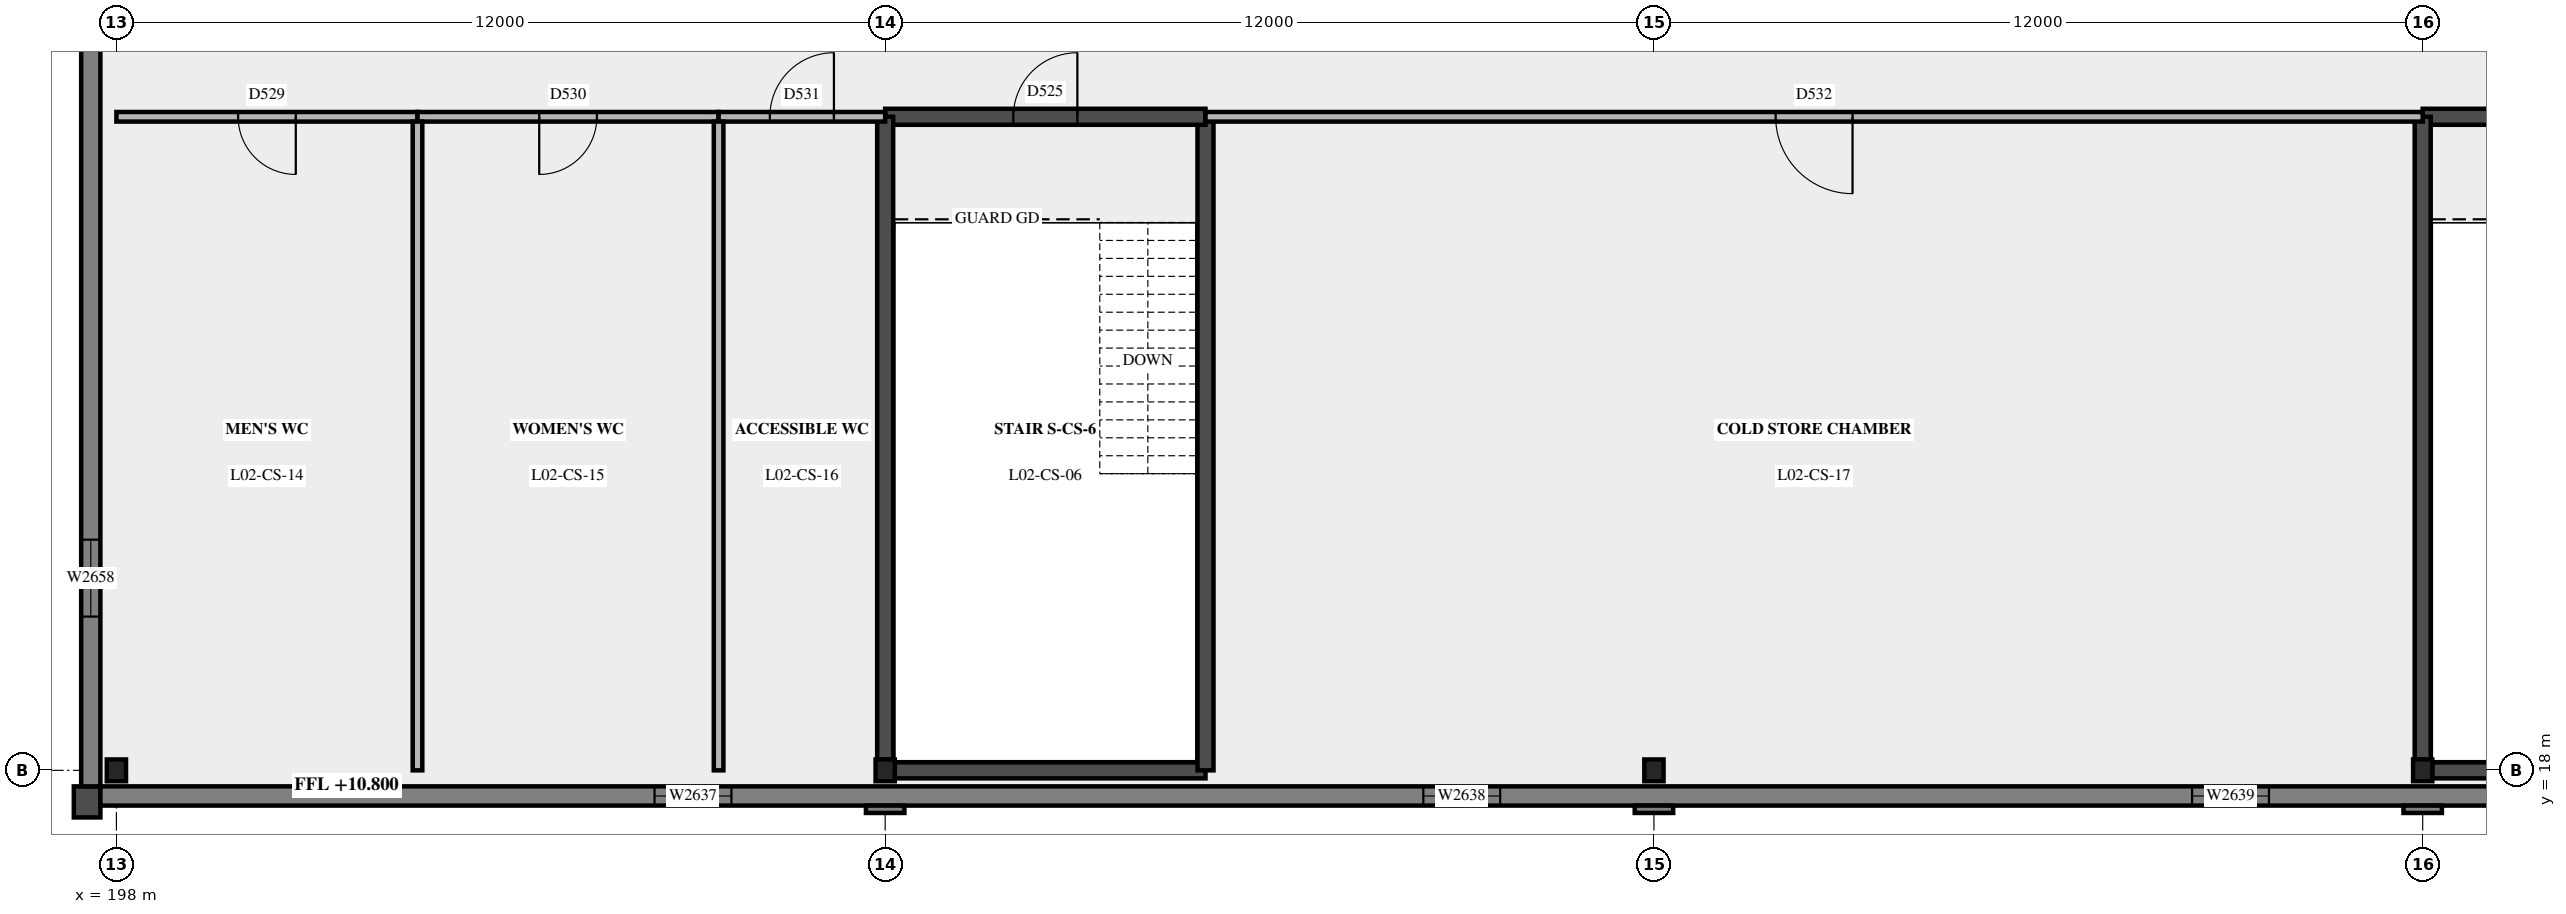
"""IFC4 building model, lengths in metres.
Left out: names, types, materials, properties, quantities, classifications, styles, units other than length and angle.
Written with IfcOpenShell. Run it as: python <this file> out.ifc"""

import sys

from ifc_helpers import new_model, si_unit, direction, frame, frame_2d, origin, origin_2d, place, context, subcontext, project, spatial, polyline, rectangle, i_section, outline, extrude, element, fill, save


model = new_model("IFC4")
c1 = context("Model", 3, precision=1e-05, world=origin(), true_north=direction((0.0, 1.0)))
c2 = subcontext(c1, "Body", "Model", "MODEL_VIEW")
j1 = project(units=[si_unit("LENGTHUNIT", "METRE"), si_unit("PLANEANGLEUNIT", "RADIAN")], contexts=[c1])
p1 = place(None, origin())
s1 = spatial("IfcSite", under=j1, at=p1, CompositionType="ELEMENT")
p2 = place(p1, origin())
s2 = spatial("IfcBuilding", under=s1, at=p2, CompositionType="ELEMENT")
p3 = place(p2, frame((0.0, 0.0, 10.8)))
s3 = spatial("IfcBuildingStorey", under=s2, at=p3, CompositionType="ELEMENT", Elevation=10.8)
for number, where, z_axis, x_axis in (
    (1, (198.0, 18.0, 0.0), (0.0, 0.0, 1.0), (1.0, 0.0, 0.0)),
    (2, (210.0, 18.0, 0.0), (0.0, 0.0, 1.0), (1.0, 0.0, 0.0)),
    (3, (222.0, 18.0, 0.0), (0.0, 0.0, 1.0), (1.0, 0.0, 0.0)),
    (4, (234.0, 18.0, 0.0), (0.0, 0.0, 1.0), (1.0, 0.0, 0.0)),
):
    element("IfcColumn", number, at=place(p3, frame(where, z_axis=z_axis, x_axis=x_axis)), inside=s3, PredefinedType="COLUMN", context=c2, shape_type="SweptSolid", body=[
        extrude(i_section(OverallWidth=0.3, OverallDepth=0.34, WebThickness=0.012, FlangeThickness=0.021, at=origin_2d()), origin(), (0.0, 0.0, 1.0), 5.4),
    ])
p4 = place(p3, frame((234.15, 18.0, 0.0), z_axis=(0.0, 0.0, 1.0), x_axis=(1.0, 0.0, 0.0)))
e5 = element("IfcWall", 5, at=p4, inside=s3, PredefinedType="SHEAR", context=c2, shape_type="SweptSolid", body=[
    extrude(rectangle(XDim=4.85, YDim=0.25, at=frame_2d((2.425, 0.0))), origin(), (0.0, 0.0, 1.0), 5.15),
])
p5 = place(p3, frame((234.0, 28.2, 0.0), z_axis=(0.0, 0.0, 1.0), x_axis=(1.0, 0.0, 0.0)))
e6 = element("IfcWall", 6, at=p5, inside=s3, PredefinedType="SHEAR", context=c2, shape_type="SweptSolid", body=[
    extrude(rectangle(XDim=5.0, YDim=0.25, at=frame_2d((2.5, 0.0))), origin(), (0.0, 0.0, 1.0), 5.15),
])
p6 = place(p5, frame((2.0, 0.0, 0.0)))
e7 = element("IfcOpeningElement", 7, at=p6, cuts=e6, PredefinedType="OPENING", context=c2, shape_type="SweptSolid", body=[
    extrude(rectangle(XDim=1.0, YDim=2.1, at=frame_2d((0.5, 1.05))), frame((0.0, 0.135, 0.0), z_axis=(0.0, -1.0, 0.0), x_axis=(1.0, 0.0, 0.0)), (0.0, 0.0, 1.0), 0.27),
])
p7 = place(p3, frame((234.0, 18.17, 0.0), z_axis=(0.0, 0.0, 1.0), x_axis=(0.0, 1.0, 0.0)))
e8 = element("IfcWall", 8, at=p7, inside=s3, PredefinedType="SHEAR", context=c2, shape_type="SweptSolid", body=[
    extrude(rectangle(XDim=10.03, YDim=0.25, at=frame_2d((5.015, 0.0))), origin(), (0.0, 0.0, 1.0), 5.15),
])
p8 = place(p3, frame((210.15, 18.0, 0.0), z_axis=(0.0, 0.0, 1.0), x_axis=(1.0, 0.0, 0.0)))
e9 = element("IfcWall", 9, at=p8, inside=s3, PredefinedType="SHEAR", context=c2, shape_type="SweptSolid", body=[
    extrude(rectangle(XDim=4.85, YDim=0.25, at=frame_2d((2.425, 0.0))), origin(), (0.0, 0.0, 1.0), 5.15),
])
p9 = place(p3, frame((215.0, 18.0, 0.0), z_axis=(0.0, 0.0, 1.0), x_axis=(0.0, 1.0, 0.0)))
e10 = element("IfcWall", 10, at=p9, inside=s3, PredefinedType="SHEAR", context=c2, shape_type="SweptSolid", body=[
    extrude(rectangle(XDim=10.2, YDim=0.25, at=frame_2d((5.1, 0.0))), origin(), (0.0, 0.0, 1.0), 5.15),
])
p10 = place(p3, frame((210.0, 28.2, 0.0), z_axis=(0.0, 0.0, 1.0), x_axis=(1.0, 0.0, 0.0)))
e11 = element("IfcWall", 11, at=p10, inside=s3, PredefinedType="SHEAR", context=c2, shape_type="SweptSolid", body=[
    extrude(rectangle(XDim=5.0, YDim=0.25, at=frame_2d((2.5, 0.0))), origin(), (0.0, 0.0, 1.0), 5.15),
])
p11 = place(p10, frame((2.0, 0.0, 0.0)))
e12 = element("IfcOpeningElement", 12, at=p11, cuts=e11, PredefinedType="OPENING", context=c2, shape_type="SweptSolid", body=[
    extrude(rectangle(XDim=1.0, YDim=2.1, at=frame_2d((0.5, 1.05))), frame((0.0, 0.135, 0.0), z_axis=(0.0, -1.0, 0.0), x_axis=(1.0, 0.0, 0.0)), (0.0, 0.0, 1.0), 0.27),
])
p12 = place(p3, frame((210.0, 18.17, 0.0), z_axis=(0.0, 0.0, 1.0), x_axis=(0.0, 1.0, 0.0)))
e13 = element("IfcWall", 13, at=p12, inside=s3, PredefinedType="SHEAR", context=c2, shape_type="SweptSolid", body=[
    extrude(rectangle(XDim=10.03, YDim=0.25, at=frame_2d((5.015, 0.0))), origin(), (0.0, 0.0, 1.0), 5.15),
])
p13 = place(p3, frame((197.75, 17.508, 0.0), z_axis=(0.0, 0.0, 1.0), x_axis=(-1.0, 0.0, 0.0)))
e14 = element("IfcWall", 14, at=p13, inside=s3, PredefinedType="SOLIDWALL", context=c2, shape_type="SweptSolid", body=[
    extrude(rectangle(XDim=0.415, YDim=0.485, at=frame_2d((0.208, 0.0))), origin(), (0.0, 0.0, 1.0), 5.01),
])
p14 = place(p3, frame((197.75, 17.472, 5.01), z_axis=(0.0, 0.0, 1.0), x_axis=(-1.0, 0.0, 0.0)))
e15 = element("IfcWall", 15, at=p14, inside=s3, PredefinedType="SOLIDWALL", context=c2, shape_type="SweptSolid", body=[
    extrude(rectangle(XDim=0.53, YDim=0.555, at=frame_2d((0.265, 0.0))), origin(), (0.0, 0.0, 1.0), 0.13),
])
p15 = place(p3, frame((197.75, 17.438, 5.14), z_axis=(0.0, 0.0, 1.0), x_axis=(-1.0, 0.0, 0.0)))
e16 = element("IfcWall", 16, at=p15, inside=s3, PredefinedType="SOLIDWALL", context=c2, shape_type="SweptSolid", body=[
    extrude(rectangle(XDim=0.645, YDim=0.625, at=frame_2d((0.323, 0.0))), origin(), (0.0, 0.0, 1.0), 0.13),
])
p16 = place(p3, frame((197.75, 17.403, 5.27), z_axis=(0.0, 0.0, 1.0), x_axis=(-1.0, 0.0, 0.0)))
e17 = element("IfcWall", 17, at=p16, inside=s3, PredefinedType="SOLIDWALL", context=c2, shape_type="SweptSolid", body=[
    extrude(rectangle(XDim=0.76, YDim=0.695, at=frame_2d((0.38, 0.0))), origin(), (0.0, 0.0, 1.0), 0.13),
])
p17 = place(p3, frame((197.75, 17.6, 0.0), z_axis=(0.0, 0.0, 1.0), x_axis=(1.0, 0.0, 0.0)))
e18 = element("IfcWall", 18, at=p17, inside=s3, PredefinedType="SOLIDWALL", context=c2, shape_type="SweptSolid", body=[
    extrude(rectangle(XDim=84.5, YDim=0.3, at=frame_2d((42.25, 0.0))), origin(), (0.0, 0.0, 1.0), 5.4),
])
p18 = place(p17, frame((8.65, 0.0, 1.2)))
e19 = element("IfcOpeningElement", 19, at=p18, cuts=e18, PredefinedType="OPENING", context=c2, shape_type="SweptSolid", body=[
    extrude(rectangle(XDim=1.2, YDim=1.5, at=frame_2d((0.6, 0.75))), frame((0.0, 0.16, 0.0), z_axis=(0.0, -1.0, 0.0), x_axis=(1.0, 0.0, 0.0)), (0.0, 0.0, 1.0), 0.32),
])
p19 = place(p17, frame((20.65, 0.0, 1.2)))
e20 = element("IfcOpeningElement", 20, at=p19, cuts=e18, PredefinedType="OPENING", context=c2, shape_type="SweptSolid", body=[
    extrude(rectangle(XDim=1.2, YDim=1.5, at=frame_2d((0.6, 0.75))), frame((0.0, 0.16, 0.0), z_axis=(0.0, -1.0, 0.0), x_axis=(1.0, 0.0, 0.0)), (0.0, 0.0, 1.0), 0.32),
])
p20 = place(p17, frame((32.65, 0.0, 1.2)))
e21 = element("IfcOpeningElement", 21, at=p20, cuts=e18, PredefinedType="OPENING", context=c2, shape_type="SweptSolid", body=[
    extrude(rectangle(XDim=1.2, YDim=1.5, at=frame_2d((0.6, 0.75))), frame((0.0, 0.16, 0.0), z_axis=(0.0, -1.0, 0.0), x_axis=(1.0, 0.0, 0.0)), (0.0, 0.0, 1.0), 0.32),
])
p21 = place(p17, frame((44.65, 0.0, 1.2)))
e22 = element("IfcOpeningElement", 22, at=p21, cuts=e18, PredefinedType="OPENING", context=c2, shape_type="SweptSolid", body=[
    extrude(rectangle(XDim=1.2, YDim=1.5, at=frame_2d((0.6, 0.75))), frame((0.0, 0.16, 0.0), z_axis=(0.0, -1.0, 0.0), x_axis=(1.0, 0.0, 0.0)), (0.0, 0.0, 1.0), 0.32),
])
p22 = place(p17, frame((56.65, 0.0, 1.2)))
e23 = element("IfcOpeningElement", 23, at=p22, cuts=e18, PredefinedType="OPENING", context=c2, shape_type="SweptSolid", body=[
    extrude(rectangle(XDim=1.2, YDim=1.5, at=frame_2d((0.6, 0.75))), frame((0.0, 0.16, 0.0), z_axis=(0.0, -1.0, 0.0), x_axis=(1.0, 0.0, 0.0)), (0.0, 0.0, 1.0), 0.32),
])
p23 = place(p17, frame((68.65, 0.0, 1.2)))
e24 = element("IfcOpeningElement", 24, at=p23, cuts=e18, PredefinedType="OPENING", context=c2, shape_type="SweptSolid", body=[
    extrude(rectangle(XDim=1.2, YDim=1.5, at=frame_2d((0.6, 0.75))), frame((0.0, 0.16, 0.0), z_axis=(0.0, -1.0, 0.0), x_axis=(1.0, 0.0, 0.0)), (0.0, 0.0, 1.0), 0.32),
])
p24 = place(p17, frame((80.65, 0.0, 1.2)))
e25 = element("IfcOpeningElement", 25, at=p24, cuts=e18, PredefinedType="OPENING", context=c2, shape_type="SweptSolid", body=[
    extrude(rectangle(XDim=1.2, YDim=1.5, at=frame_2d((0.6, 0.75))), frame((0.0, 0.16, 0.0), z_axis=(0.0, -1.0, 0.0), x_axis=(1.0, 0.0, 0.0)), (0.0, 0.0, 1.0), 0.32),
])
for number, where, z_axis, x_axis in (
    (26, (209.7, 17.393, 0.0), (0.0, 0.0, 1.0), (1.0, 0.0, 0.0)),
    (27, (221.7, 17.393, 0.0), (0.0, 0.0, 1.0), (1.0, 0.0, 0.0)),
    (28, (233.7, 17.393, 0.0), (0.0, 0.0, 1.0), (1.0, 0.0, 0.0)),
):
    element("IfcWall", number, at=place(p3, frame(where, z_axis=z_axis, x_axis=x_axis)), inside=s3, PredefinedType="SOLIDWALL", context=c2, shape_type="SweptSolid", body=[
        extrude(rectangle(XDim=0.6, YDim=0.115, at=frame_2d((0.3, 0.0))), origin(), (0.0, 0.0, 1.0), 5.4),
    ])
p25 = place(p3, frame((197.6, 66.25, 0.0), z_axis=(0.0, 0.0, 1.0), x_axis=(0.0, -1.0, 0.0)))
e29 = element("IfcWall", 29, at=p25, inside=s3, PredefinedType="SOLIDWALL", context=c2, shape_type="SweptSolid", body=[
    extrude(rectangle(XDim=48.5, YDim=0.3, at=frame_2d((24.25, 0.0))), origin(), (0.0, 0.0, 1.0), 5.4),
])
p26 = place(p25, frame((8.65, 0.0, 1.2)))
e30 = element("IfcOpeningElement", 30, at=p26, cuts=e29, PredefinedType="OPENING", context=c2, shape_type="SweptSolid", body=[
    extrude(rectangle(XDim=1.2, YDim=1.5, at=frame_2d((0.6, 0.75))), frame((0.0, 0.16, 0.0), z_axis=(0.0, -1.0, 0.0), x_axis=(1.0, 0.0, 0.0)), (0.0, 0.0, 1.0), 0.32),
])
p27 = place(p25, frame((20.65, 0.0, 1.2)))
e31 = element("IfcOpeningElement", 31, at=p27, cuts=e29, PredefinedType="OPENING", context=c2, shape_type="SweptSolid", body=[
    extrude(rectangle(XDim=1.2, YDim=1.5, at=frame_2d((0.6, 0.75))), frame((0.0, 0.16, 0.0), z_axis=(0.0, -1.0, 0.0), x_axis=(1.0, 0.0, 0.0)), (0.0, 0.0, 1.0), 0.32),
])
p28 = place(p25, frame((32.65, 0.0, 1.2)))
e32 = element("IfcOpeningElement", 32, at=p28, cuts=e29, PredefinedType="OPENING", context=c2, shape_type="SweptSolid", body=[
    extrude(rectangle(XDim=1.2, YDim=1.5, at=frame_2d((0.6, 0.75))), frame((0.0, 0.16, 0.0), z_axis=(0.0, -1.0, 0.0), x_axis=(1.0, 0.0, 0.0)), (0.0, 0.0, 1.0), 0.32),
])
p29 = place(p25, frame((44.65, 0.0, 1.2)))
e33 = element("IfcOpeningElement", 33, at=p29, cuts=e29, PredefinedType="OPENING", context=c2, shape_type="SweptSolid", body=[
    extrude(rectangle(XDim=1.2, YDim=1.5, at=frame_2d((0.6, 0.75))), frame((0.0, 0.16, 0.0), z_axis=(0.0, -1.0, 0.0), x_axis=(1.0, 0.0, 0.0)), (0.0, 0.0, 1.0), 0.32),
])
p30 = place(p3, frame((198.0, 28.2, 0.0), z_axis=(0.0, 0.0, 1.0), x_axis=(1.0, 0.0, 0.0)))
e34 = element("IfcWall", 34, at=p30, inside=s3, PredefinedType="PARTITIONING", context=c2, shape_type="SweptSolid", body=[
    extrude(outline(polyline([(0.0, 0.0), (4.7, 0.0), (4.7, 5.15), (2.505, 5.15), (2.5, 4.63), (2.3, 4.63), (2.295, 5.15), (0.1, 5.15), (0.095, 4.68), (0.0, 4.68), (0.0, 0.0)])), frame((0.0, 0.075, 0.0), z_axis=(0.0, -1.0, 0.0), x_axis=(1.0, 0.0, 0.0)), (0.0, 0.0, 1.0), 0.15),
])
p31 = place(p30, frame((1.9, 0.0, 0.0)))
e35 = element("IfcOpeningElement", 35, at=p31, cuts=e34, PredefinedType="OPENING", context=c2, shape_type="SweptSolid", body=[
    extrude(rectangle(XDim=0.9, YDim=2.1, at=frame_2d((0.45, 1.05))), frame((0.0, 0.085, 0.0), z_axis=(0.0, -1.0, 0.0), x_axis=(1.0, 0.0, 0.0)), (0.0, 0.0, 1.0), 0.17),
])
p32 = place(p3, frame((202.7, 28.2, 0.0), z_axis=(0.0, 0.0, 1.0), x_axis=(1.0, 0.0, 0.0)))
e36 = element("IfcWall", 36, at=p32, inside=s3, PredefinedType="PARTITIONING", context=c2, shape_type="SweptSolid", body=[
    extrude(outline(polyline([(0.0, 0.0), (4.7, 0.0), (4.7, 5.15), (2.605, 5.15), (2.6, 4.63), (2.4, 4.63), (2.395, 5.15), (0.205, 5.15), (0.2, 4.63), (0.0, 4.63), (0.0, 0.0)])), frame((0.0, 0.075, 0.0), z_axis=(0.0, -1.0, 0.0), x_axis=(1.0, 0.0, 0.0)), (0.0, 0.0, 1.0), 0.15),
])
p33 = place(p32, frame((1.9, 0.0, 0.0)))
e37 = element("IfcOpeningElement", 37, at=p33, cuts=e36, PredefinedType="OPENING", context=c2, shape_type="SweptSolid", body=[
    extrude(rectangle(XDim=0.9, YDim=2.1, at=frame_2d((0.45, 1.05))), frame((0.0, 0.085, 0.0), z_axis=(0.0, -1.0, 0.0), x_axis=(1.0, 0.0, 0.0)), (0.0, 0.0, 1.0), 0.17),
])
p34 = place(p3, frame((207.4, 28.2, 0.0), z_axis=(0.0, 0.0, 1.0), x_axis=(1.0, 0.0, 0.0)))
e38 = element("IfcWall", 38, at=p34, inside=s3, PredefinedType="PARTITIONING", context=c2, shape_type="SweptSolid", body=[
    extrude(outline(polyline([(0.0, 0.0), (2.6, 0.0), (2.6, 5.15), (0.305, 5.15), (0.3, 4.63), (0.1, 4.63), (0.095, 5.15), (0.0, 5.15), (0.0, 0.0)])), frame((0.0, 0.075, 0.0), z_axis=(0.0, -1.0, 0.0), x_axis=(1.0, 0.0, 0.0)), (0.0, 0.0, 1.0), 0.15),
])
p35 = place(p34, frame((0.8, 0.0, 0.0)))
e39 = element("IfcOpeningElement", 39, at=p35, cuts=e38, PredefinedType="OPENING", context=c2, shape_type="SweptSolid", body=[
    extrude(rectangle(XDim=1.0, YDim=2.1, at=frame_2d((0.5, 1.05))), frame((0.0, 0.085, 0.0), z_axis=(0.0, -1.0, 0.0), x_axis=(1.0, 0.0, 0.0)), (0.0, 0.0, 1.0), 0.17),
])
p36 = place(p3, frame((215.0, 28.2, 0.0), z_axis=(0.0, 0.0, 1.0), x_axis=(1.0, 0.0, 0.0)))
e40 = element("IfcWall", 40, at=p36, inside=s3, PredefinedType="PARTITIONING", context=c2, shape_type="SweptSolid", body=[
    extrude(outline(polyline([(0.0, 0.0), (19.0, 0.0), (19.0, 5.15), (16.705, 5.15), (16.7, 4.63), (16.5, 4.63), (16.495, 5.15), (14.305, 5.15), (14.3, 4.63), (14.1, 4.63), (14.095, 5.15), (11.905, 5.15), (11.9, 4.63), (11.7, 4.63), (11.695, 5.15), (9.505, 5.15), (9.5, 4.63), (9.3, 4.63), (9.295, 5.15), (7.1, 5.15), (7.095, 4.68), (6.905, 4.68), (6.9, 5.15), (4.705, 5.15), (4.7, 4.63), (4.5, 4.63), (4.495, 5.15), (2.305, 5.15), (2.3, 4.63), (2.1, 4.63), (2.095, 5.15), (0.0, 5.15), (0.0, 0.0)])), frame((0.0, 0.075, 0.0), z_axis=(0.0, -1.0, 0.0), x_axis=(1.0, 0.0, 0.0)), (0.0, 0.0, 1.0), 0.15),
])
p37 = place(p36, frame((8.9, 0.0, 0.0)))
e41 = element("IfcOpeningElement", 41, at=p37, cuts=e40, PredefinedType="OPENING", context=c2, shape_type="SweptSolid", body=[
    extrude(rectangle(XDim=1.2, YDim=2.4, at=frame_2d((0.6, 1.2))), frame((0.0, 0.085, 0.0), z_axis=(0.0, -1.0, 0.0), x_axis=(1.0, 0.0, 0.0)), (0.0, 0.0, 1.0), 0.17),
])
p38 = place(p3, frame((202.7, 18.0, 0.0), z_axis=(0.0, 0.0, 1.0), x_axis=(0.0, 1.0, 0.0)))
e42 = element("IfcWall", 42, at=p38, inside=s3, PredefinedType="PARTITIONING", context=c2, shape_type="SweptSolid", body=[
    extrude(rectangle(XDim=10.125, YDim=0.15, at=frame_2d((5.062, 0.0))), origin(), (0.0, 0.0, 1.0), 4.63),
])
p39 = place(p3, frame((207.4, 18.0, 0.0), z_axis=(0.0, 0.0, 1.0), x_axis=(0.0, 1.0, 0.0)))
e43 = element("IfcWall", 43, at=p39, inside=s3, PredefinedType="PARTITIONING", context=c2, shape_type="SweptSolid", body=[
    extrude(outline(polyline([(0.0, 0.0), (10.125, 0.0), (10.125, 5.15), (0.105, 5.15), (0.1, 4.63), (0.0, 4.63), (0.0, 0.0)])), frame((0.0, 0.075, 0.0), z_axis=(0.0, -1.0, 0.0), x_axis=(1.0, 0.0, 0.0)), (0.0, 0.0, 1.0), 0.15),
])
p40 = place(p18, origin())
e44 = element("IfcWindow", 44, at=p40, inside=s3, PartitioningType="SINGLE_PANEL", PredefinedType="WINDOW", context=c2, shape_type="SweptSolid", body=[
    extrude(rectangle(XDim=1.2, YDim=1.5, at=frame_2d((0.6, 0.75))), frame((0.0, 0.03, 0.0), z_axis=(0.0, -1.0, 0.0), x_axis=(1.0, 0.0, 0.0)), (0.0, 0.0, 1.0), 0.06),
])
fill(e19, e44)
p41 = place(p19, origin())
e45 = element("IfcWindow", 45, at=p41, inside=s3, PartitioningType="SINGLE_PANEL", PredefinedType="WINDOW", context=c2, shape_type="SweptSolid", body=[
    extrude(rectangle(XDim=1.2, YDim=1.5, at=frame_2d((0.6, 0.75))), frame((0.0, 0.03, 0.0), z_axis=(0.0, -1.0, 0.0), x_axis=(1.0, 0.0, 0.0)), (0.0, 0.0, 1.0), 0.06),
])
fill(e20, e45)
p42 = place(p20, origin())
e46 = element("IfcWindow", 46, at=p42, inside=s3, PartitioningType="SINGLE_PANEL", PredefinedType="WINDOW", context=c2, shape_type="SweptSolid", body=[
    extrude(rectangle(XDim=1.2, YDim=1.5, at=frame_2d((0.6, 0.75))), frame((0.0, 0.03, 0.0), z_axis=(0.0, -1.0, 0.0), x_axis=(1.0, 0.0, 0.0)), (0.0, 0.0, 1.0), 0.06),
])
fill(e21, e46)
p43 = place(p29, origin())
e47 = element("IfcWindow", 47, at=p43, inside=s3, PartitioningType="SINGLE_PANEL", PredefinedType="WINDOW", context=c2, shape_type="SweptSolid", body=[
    extrude(rectangle(XDim=1.2, YDim=1.5, at=frame_2d((0.6, 0.75))), frame((0.0, 0.03, 0.0), z_axis=(0.0, -1.0, 0.0), x_axis=(1.0, 0.0, 0.0)), (0.0, 0.0, 1.0), 0.06),
])
fill(e33, e47)
p44 = place(p11, origin())
e48 = element("IfcDoor", 48, at=p44, inside=s3, OperationType="SINGLE_SWING_RIGHT", PredefinedType="DOOR", context=c2, shape_type="SweptSolid", body=[
    extrude(rectangle(XDim=1.0, YDim=2.1, at=frame_2d((0.5, 1.05))), frame((0.0, 0.025, 0.0), z_axis=(0.0, -1.0, 0.0), x_axis=(1.0, 0.0, 0.0)), (0.0, 0.0, 1.0), 0.05),
])
fill(e12, e48)
p45 = place(p31, origin())
e49 = element("IfcDoor", 49, at=p45, inside=s3, OperationType="SINGLE_SWING_LEFT", PredefinedType="DOOR", context=c2, shape_type="SweptSolid", body=[
    extrude(rectangle(XDim=0.9, YDim=2.1, at=frame_2d((0.45, 1.05))), frame((0.0, 0.025, 0.0), z_axis=(0.0, -1.0, 0.0), x_axis=(1.0, 0.0, 0.0)), (0.0, 0.0, 1.0), 0.05),
])
fill(e35, e49)
p46 = place(p33, origin())
e50 = element("IfcDoor", 50, at=p46, inside=s3, OperationType="SINGLE_SWING_RIGHT", PredefinedType="DOOR", context=c2, shape_type="SweptSolid", body=[
    extrude(rectangle(XDim=0.9, YDim=2.1, at=frame_2d((0.45, 1.05))), frame((0.0, 0.025, 0.0), z_axis=(0.0, -1.0, 0.0), x_axis=(1.0, 0.0, 0.0)), (0.0, 0.0, 1.0), 0.05),
])
fill(e37, e50)
p47 = place(p35, origin())
e51 = element("IfcDoor", 51, at=p47, inside=s3, OperationType="SINGLE_SWING_RIGHT", PredefinedType="DOOR", context=c2, shape_type="SweptSolid", body=[
    extrude(rectangle(XDim=1.0, YDim=2.1, at=frame_2d((0.5, 1.05))), frame((0.0, 0.025, 0.0), z_axis=(0.0, -1.0, 0.0), x_axis=(1.0, 0.0, 0.0)), (0.0, 0.0, 1.0), 0.05),
])
fill(e39, e51)
p48 = place(p37, origin())
e52 = element("IfcDoor", 52, at=p48, inside=s3, OperationType="SINGLE_SWING_LEFT", PredefinedType="DOOR", context=c2, shape_type="SweptSolid", body=[
    extrude(rectangle(XDim=1.2, YDim=2.4, at=frame_2d((0.6, 1.2))), frame((0.0, 0.025, 0.0), z_axis=(0.0, -1.0, 0.0), x_axis=(1.0, 0.0, 0.0)), (0.0, 0.0, 1.0), 0.05),
])
fill(e41, e52)
save(model, sys.argv[1])
